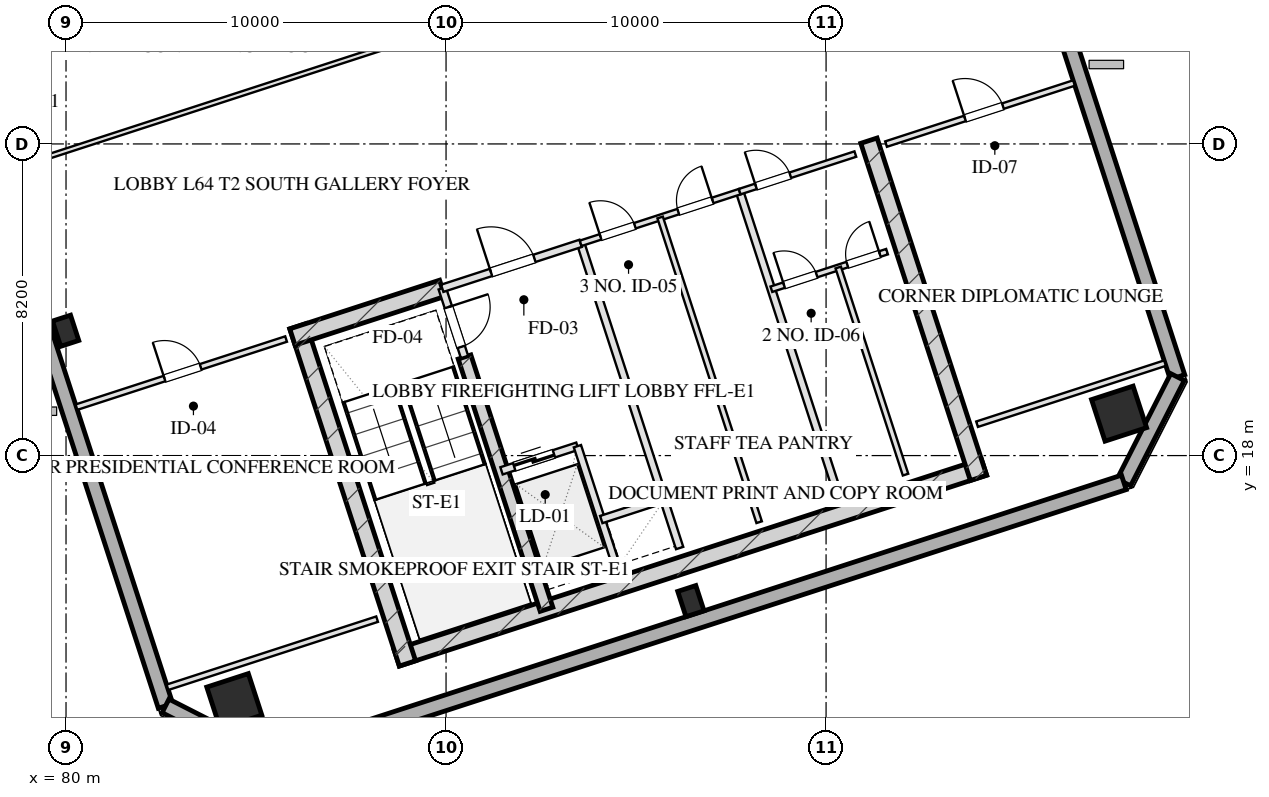
"""IFC4 building model, lengths in metres.
Left out: names, types, materials, properties, quantities, classifications, styles, units other than length and angle.
Written with IfcOpenShell. Run it as: python <this file> out.ifc"""

import sys

from ifc_helpers import new_model, si_unit, direction, frame, frame_2d, origin, origin_2d, place, context, subcontext, project, spatial, rectangle, hollow_rectangle, extrude, element, fill, save


model = new_model("IFC4")
c1 = context("Model", 3, precision=1e-05, world=origin(), true_north=direction((0.0, 1.0)))
c2 = subcontext(c1, "Body", "Model", "MODEL_VIEW")
j1 = project(units=[si_unit("LENGTHUNIT", "METRE"), si_unit("PLANEANGLEUNIT", "RADIAN")], contexts=[c1])
p1 = place(None, origin())
s1 = spatial("IfcSite", under=j1, at=p1, CompositionType="ELEMENT")
p2 = place(p1, origin())
s2 = spatial("IfcBuilding", under=s1, at=p2, CompositionType="ELEMENT")
p3 = place(p2, frame((0.0, 0.0, 237.6)))
s3 = spatial("IfcBuildingStorey", under=s2, at=p3, CompositionType="ELEMENT", Elevation=237.6)
p4 = place(p3, frame((88.701, 12.675, 0.0), z_axis=(0.0, 0.0, 1.0), x_axis=(0.95105824505, 0.309011673763, 0.0)))
e1 = element("IfcWall", 1, at=p4, inside=s3, PredefinedType="SHEAR", context=c2, shape_type="SweptSolid", body=[
    extrude(rectangle(XDim=16.25, YDim=0.45, at=frame_2d((8.125, 0.0))), origin(), (0.0, 0.0, 1.0), 3.2),
])
for number, where, z_axis, x_axis in (
    (2, (86.102, 21.404, 0.0), (0.0, 0.0, 1.0), (0.309, -0.951, 0.0)),
    (3, (101.128, 26.286, 0.0), (0.0, 0.0, 1.0), (0.309, -0.951, 0.0)),
):
    element("IfcWall", number, at=place(p3, frame(where, z_axis=z_axis, x_axis=x_axis)), inside=s3, PredefinedType="SHEAR", context=c2, shape_type="SweptSolid", body=[
        extrude(rectangle(XDim=9.33, YDim=0.45, at=frame_2d((4.665, 0.0))), origin(), (0.0, 0.0, 1.0), 3.2),
    ])
p5 = place(p3, frame((90.486, 20.594, 0.0), z_axis=(0.0, 0.0, 1.0), x_axis=(0.309020428229, -0.951055400562, 0.0)))
e4 = element("IfcWall", 4, at=p5, inside=s3, PredefinedType="SHEAR", context=c2, shape_type="SweptSolid", body=[
    extrude(rectangle(XDim=6.98, YDim=0.35, at=frame_2d((3.49, 0.0))), origin(), (0.0, 0.0, 1.0), 3.2),
])
p6 = place(p3, frame((85.957, 21.12, 0.0), z_axis=(0.0, 0.0, 1.0), x_axis=(0.951064796122, 0.308991510526, 0.0)))
e5 = element("IfcWall", 5, at=p6, inside=s3, PredefinedType="SHEAR", context=c2, shape_type="SweptSolid", body=[
    extrude(rectangle(XDim=4.145, YDim=0.45, at=frame_2d((2.073, 0.0))), origin(), (0.0, 0.0, 1.0), 3.2),
])
for number, where, z_axis, x_axis in (
    (6, (84.428, 11.539, 0.0), (0.0, 0.0, 1.0), (0.951, 0.309, 0.0)),
    (7, (107.71, 19.104, 0.0), (0.0, 0.0, 1.0), (0.951, 0.309, 0.0)),
):
    element("IfcColumn", number, at=place(p3, frame(where, z_axis=z_axis, x_axis=x_axis)), inside=s3, PredefinedType="COLUMN", context=c2, shape_type="SweptSolid", body=[
        extrude(hollow_rectangle(XDim=1.15, YDim=1.15, WallThickness=0.04, at=origin_2d()), origin(), (0.0, 0.0, 1.0), 3.201),
    ])
for number, where, z_axis, x_axis in (
    (8, (79.99, 21.284, 0.0), (0.0, 0.0, 1.0), (0.951, 0.309, 0.0)),
    (9, (96.443, 14.17, 0.0), (0.0, 0.0, 1.0), (0.951, 0.309, 0.0)),
):
    element("IfcColumn", number, at=place(p3, frame(where, z_axis=z_axis, x_axis=x_axis)), inside=s3, PredefinedType="COLUMN", context=c2, shape_type="SweptSolid", body=[
        extrude(hollow_rectangle(XDim=0.5, YDim=0.7, WallThickness=0.025, at=origin_2d()), origin(), (0.0, 0.0, 1.0), 3.201),
    ])
p7 = place(p3, frame((82.618, 11.414, 0.0), z_axis=(0.0, 0.0, 1.0), x_axis=(-0.309016491071, 0.951056679828, 0.0)))
e10 = element("IfcWall", 10, at=p7, inside=s3, PredefinedType="SOLIDWALL", context=c2, shape_type="SweptSolid", body=[
    extrude(rectangle(XDim=38.4, YDim=0.4, at=frame_2d((19.2, 0.0))), origin(), (0.0, 0.0, 1.0), 2.36),
])
p8 = place(p7, frame((20.825, 0.0, 0.75)))
e11 = element("IfcOpeningElement", 11, at=p8, cuts=e10, PredefinedType="OPENING", context=c2, shape_type="SweptSolid", body=[
    extrude(rectangle(XDim=1.95, YDim=1.21, at=frame_2d((0.975, 0.605))), frame((0.0, 0.21, 0.0), z_axis=(0.0, -1.0, 0.0), x_axis=(1.0, 0.0, 0.0)), (0.0, 0.0, 1.0), 0.42),
])
p9 = place(p7, frame((24.625, 0.0, 0.75)))
e12 = element("IfcOpeningElement", 12, at=p9, cuts=e10, PredefinedType="OPENING", context=c2, shape_type="SweptSolid", body=[
    extrude(rectangle(XDim=1.95, YDim=1.21, at=frame_2d((0.975, 0.605))), frame((0.0, 0.21, 0.0), z_axis=(0.0, -1.0, 0.0), x_axis=(1.0, 0.0, 0.0)), (0.0, 0.0, 1.0), 0.42),
])
p10 = place(p7, frame((15.8, 0.0, 0.0)))
e13 = element("IfcOpeningElement", 13, at=p10, cuts=e10, PredefinedType="OPENING", context=c2, shape_type="SweptSolid", body=[
    extrude(rectangle(XDim=1.1, YDim=2.15, at=frame_2d((0.55, 1.075))), frame((0.0, 0.21, 0.0), z_axis=(0.0, -1.0, 0.0), x_axis=(1.0, 0.0, 0.0)), (0.0, 0.0, 1.0), 0.42),
])
p11 = place(p3, frame((97.382, 56.586, 0.0), z_axis=(0.0, 0.0, 1.0), x_axis=(0.309016491071, -0.951056679828, 0.0)))
e14 = element("IfcWall", 14, at=p11, inside=s3, PredefinedType="SOLIDWALL", context=c2, shape_type="SweptSolid", body=[
    extrude(rectangle(XDim=38.4, YDim=0.4, at=frame_2d((19.2, 0.0))), origin(), (0.0, 0.0, 1.0), 2.36),
])
p12 = place(p11, frame((15.625, 0.0, 0.75)))
e15 = element("IfcOpeningElement", 15, at=p12, cuts=e14, PredefinedType="OPENING", context=c2, shape_type="SweptSolid", body=[
    extrude(rectangle(XDim=1.95, YDim=1.21, at=frame_2d((0.975, 0.605))), frame((0.0, 0.21, 0.0), z_axis=(0.0, -1.0, 0.0), x_axis=(1.0, 0.0, 0.0)), (0.0, 0.0, 1.0), 0.42),
])
p13 = place(p11, frame((11.825, 0.0, 0.75)))
e16 = element("IfcOpeningElement", 16, at=p13, cuts=e14, PredefinedType="OPENING", context=c2, shape_type="SweptSolid", body=[
    extrude(rectangle(XDim=1.95, YDim=1.21, at=frame_2d((0.975, 0.605))), frame((0.0, 0.21, 0.0), z_axis=(0.0, -1.0, 0.0), x_axis=(1.0, 0.0, 0.0)), (0.0, 0.0, 1.0), 0.42),
])
p14 = place(p11, frame((21.5, 0.0, 0.0)))
e17 = element("IfcOpeningElement", 17, at=p14, cuts=e14, PredefinedType="OPENING", context=c2, shape_type="SweptSolid", body=[
    extrude(rectangle(XDim=1.1, YDim=2.15, at=frame_2d((0.55, 1.075))), frame((0.0, 0.21, 0.0), z_axis=(0.0, -1.0, 0.0), x_axis=(1.0, 0.0, 0.0)), (0.0, 0.0, 1.0), 0.42),
])
p15 = place(p3, frame((109.248, 20.066, 0.0), z_axis=(0.0, 0.0, 1.0), x_axis=(-0.453949291228, -0.891027519774, 0.0)))
e18 = element("IfcWall", 18, at=p15, inside=s3, PredefinedType="SOLIDWALL", context=c2, shape_type="SweptSolid", body=[
    extrude(rectangle(XDim=3.111, YDim=0.4, at=frame_2d((1.556, 0.0))), origin(), (0.0, 0.0, 1.0), 2.36),
])
p16 = place(p3, frame((107.835, 17.294, 0.0), z_axis=(0.0, 0.0, 1.0), x_axis=(-0.951058012937, -0.309012388148, 0.0)))
e19 = element("IfcWall", 19, at=p16, inside=s3, PredefinedType="SOLIDWALL", context=c2, shape_type="SweptSolid", body=[
    extrude(rectangle(XDim=23.6, YDim=0.4, at=frame_2d((11.8, 0.0))), origin(), (0.0, 0.0, 1.0), 2.36),
])
p17 = place(p3, frame((85.39, 10.001, 0.0), z_axis=(0.0, 0.0, 1.0), x_axis=(-0.890979603174, 0.454043331334, 0.0)))
e20 = element("IfcWall", 20, at=p17, inside=s3, PredefinedType="SOLIDWALL", context=c2, shape_type="SweptSolid", body=[
    extrude(rectangle(XDim=3.111, YDim=0.4, at=frame_2d((1.556, 0.0))), origin(), (0.0, 0.0, 1.0), 2.36),
])
p18 = place(p3, frame((89.899, 22.401, 0.0), z_axis=(0.0, 0.0, 1.0), x_axis=(0.308932062672, -0.951084108086, 0.0)))
e21 = element("IfcWall", 21, at=p18, inside=s3, PredefinedType="PARTITIONING", context=c2, shape_type="SweptSolid", body=[
    extrude(rectangle(XDim=1.9, YDim=0.2, at=frame_2d((0.95, 0.0))), origin(), (0.0, 0.0, 1.0), 2.925),
])
p19 = place(p18, frame((0.52, 0.0, 0.0)))
e22 = element("IfcOpeningElement", 22, at=p19, cuts=e21, PredefinedType="OPENING", context=c2, shape_type="SweptSolid", body=[
    extrude(rectangle(XDim=1.1, YDim=2.05, at=frame_2d((0.55, 1.025))), frame((0.0, 0.11, 0.0), z_axis=(0.0, -1.0, 0.0), x_axis=(1.0, 0.0, 0.0)), (0.0, 0.0, 1.0), 0.22),
])
p20 = place(p3, frame((93.542, 23.585, 0.0), z_axis=(0.0, 0.0, 1.0), x_axis=(0.309042196757, -0.951048327176, 0.0)))
e23 = element("IfcWall", 23, at=p20, inside=s3, PredefinedType="PARTITIONING", context=c2, shape_type="SweptSolid", body=[
    extrude(rectangle(XDim=8.43, YDim=0.2, at=frame_2d((4.215, 0.0))), origin(), (0.0, 0.0, 1.0), 2.925),
])
p21 = place(p3, frame((89.899, 22.401, 0.0), z_axis=(0.0, 0.0, 1.0), x_axis=(0.951046716504, 0.309047153403, 0.0)))
e24 = element("IfcWall", 24, at=p21, inside=s3, PredefinedType="PARTITIONING", context=c2, shape_type="SweptSolid", body=[
    extrude(rectangle(XDim=3.83, YDim=0.2, at=frame_2d((1.915, 0.0))), origin(), (0.0, 0.0, 1.0), 2.925),
])
p22 = place(p21, frame((1.35, 0.0, 0.0)))
e25 = element("IfcOpeningElement", 25, at=p22, cuts=e24, PredefinedType="OPENING", context=c2, shape_type="SweptSolid", body=[
    extrude(rectangle(XDim=1.2, YDim=2.05, at=frame_2d((0.6, 1.025))), frame((0.0, 0.11, 0.0), z_axis=(0.0, -1.0, 0.0), x_axis=(1.0, 0.0, 0.0)), (0.0, 0.0, 1.0), 0.22),
])
p23 = place(p3, frame((91.46, 17.598, 0.0), z_axis=(0.0, 0.0, 1.0), x_axis=(0.951062257173, 0.308999325213, 0.0)))
e26 = element("IfcWall", 26, at=p23, inside=s3, PredefinedType="PARTITIONING", context=c2, shape_type="SweptSolid", body=[
    extrude(rectangle(XDim=2.1, YDim=0.2, at=frame_2d((1.05, 0.0))), origin(), (0.0, 0.0, 1.0), 2.925),
])
p24 = place(p23, frame((0.35, 0.0, 0.0)))
e27 = element("IfcOpeningElement", 27, at=p24, cuts=e26, PredefinedType="OPENING", context=c2, shape_type="SweptSolid", body=[
    extrude(rectangle(XDim=1.1, YDim=2.05, at=frame_2d((0.55, 1.025))), frame((0.0, 0.11, 0.0), z_axis=(0.0, -1.0, 0.0), x_axis=(1.0, 0.0, 0.0)), (0.0, 0.0, 1.0), 0.22),
])
p25 = place(p3, frame((93.457, 18.247, 0.0), z_axis=(0.0, 0.0, 1.0), x_axis=(0.3089935693, -0.951064127245, 0.0)))
e28 = element("IfcWall", 28, at=p25, inside=s3, PredefinedType="PARTITIONING", context=c2, shape_type="SweptSolid", body=[
    extrude(rectangle(XDim=3.7, YDim=0.2, at=frame_2d((1.85, 0.0))), origin(), (0.0, 0.0, 1.0), 2.925),
])
p26 = place(p3, frame((94.084, 16.317, 0.0), z_axis=(0.0, 0.0, 1.0), x_axis=(0.951041328149, 0.309063734775, 0.0)))
e29 = element("IfcWall", 29, at=p26, inside=s3, PredefinedType="PARTITIONING", context=c2, shape_type="SweptSolid", body=[
    extrude(rectangle(XDim=1.73, YDim=0.2, at=frame_2d((0.865, 0.0))), origin(), (0.0, 0.0, 1.0), 2.925),
])
p27 = place(p3, frame((97.727, 24.944, 0.0), z_axis=(0.0, 0.0, 1.0), x_axis=(0.309016001439, -0.951056838919, 0.0)))
e30 = element("IfcWall", 30, at=p27, inside=s3, PredefinedType="PARTITIONING", context=c2, shape_type="SweptSolid", body=[
    extrude(rectangle(XDim=8.43, YDim=0.2, at=frame_2d((4.215, 0.0))), origin(), (0.0, 0.0, 1.0), 2.925),
])
p28 = place(p3, frame((93.542, 23.585, 0.0), z_axis=(0.0, 0.0, 1.0), x_axis=(0.951063829732, 0.308994485023, 0.0)))
e31 = element("IfcWall", 31, at=p28, inside=s3, PredefinedType="PARTITIONING", context=c2, shape_type="SweptSolid", body=[
    extrude(rectangle(XDim=4.4, YDim=0.15, at=frame_2d((2.2, 0.0))), origin(), (0.0, 0.0, 1.0), 2.925),
])
p29 = place(p28, frame((0.55, 0.0, 0.0)))
e32 = element("IfcOpeningElement", 32, at=p29, cuts=e31, PredefinedType="OPENING", context=c2, shape_type="SweptSolid", body=[
    extrude(rectangle(XDim=0.95, YDim=2.05, at=frame_2d((0.475, 1.025))), frame((0.0, 0.085, 0.0), z_axis=(0.0, -1.0, 0.0), x_axis=(1.0, 0.0, 0.0)), (0.0, 0.0, 1.0), 0.17),
])
p30 = place(p28, frame((2.7, 0.0, 0.0)))
e33 = element("IfcOpeningElement", 33, at=p30, cuts=e31, PredefinedType="OPENING", context=c2, shape_type="SweptSolid", body=[
    extrude(rectangle(XDim=0.95, YDim=2.05, at=frame_2d((0.475, 1.025))), frame((0.0, 0.085, 0.0), z_axis=(0.0, -1.0, 0.0), x_axis=(1.0, 0.0, 0.0)), (0.0, 0.0, 1.0), 0.17),
])
p31 = place(p3, frame((95.634, 24.265, 0.0), z_axis=(0.0, 0.0, 1.0), x_axis=(0.309007490203, -0.951059604335, 0.0)))
e34 = element("IfcWall", 34, at=p31, inside=s3, PredefinedType="PARTITIONING", context=c2, shape_type="SweptSolid", body=[
    extrude(rectangle(XDim=8.43, YDim=0.15, at=frame_2d((4.215, 0.0))), origin(), (0.0, 0.0, 1.0), 2.925),
])
p32 = place(p3, frame((97.727, 24.944, 0.0), z_axis=(0.0, 0.0, 1.0), x_axis=(0.951036872128, 0.309077446369, 0.0)))
e35 = element("IfcWall", 35, at=p32, inside=s3, PredefinedType="PARTITIONING", context=c2, shape_type="SweptSolid", body=[
    extrude(rectangle(XDim=3.2, YDim=0.15, at=frame_2d((1.6, 0.0))), origin(), (0.0, 0.0, 1.0), 2.925),
])
p33 = place(p32, frame((0.45, 0.0, 0.0)))
e36 = element("IfcOpeningElement", 36, at=p33, cuts=e35, PredefinedType="OPENING", context=c2, shape_type="SweptSolid", body=[
    extrude(rectangle(XDim=0.95, YDim=2.05, at=frame_2d((0.475, 1.025))), frame((0.0, 0.085, 0.0), z_axis=(0.0, -1.0, 0.0), x_axis=(1.0, 0.0, 0.0)), (0.0, 0.0, 1.0), 0.17),
])
p34 = place(p3, frame((98.561, 22.376, 0.0), z_axis=(0.0, 0.0, 1.0), x_axis=(0.95104415986, 0.309055020985, 0.0)))
e37 = element("IfcWall", 37, at=p34, inside=s3, PredefinedType="PARTITIONING", context=c2, shape_type="SweptSolid", body=[
    extrude(rectangle(XDim=3.2, YDim=0.15, at=frame_2d((1.6, 0.0))), origin(), (0.0, 0.0, 1.0), 2.925),
])
p35 = place(p34, frame((0.35, 0.0, 0.0)))
e38 = element("IfcOpeningElement", 38, at=p35, cuts=e37, PredefinedType="OPENING", context=c2, shape_type="SweptSolid", body=[
    extrude(rectangle(XDim=0.9, YDim=2.05, at=frame_2d((0.45, 1.025))), frame((0.0, 0.085, 0.0), z_axis=(0.0, -1.0, 0.0), x_axis=(1.0, 0.0, 0.0)), (0.0, 0.0, 1.0), 0.17),
])
p36 = place(p34, frame((2.1, 0.0, 0.0)))
e39 = element("IfcOpeningElement", 39, at=p36, cuts=e37, PredefinedType="OPENING", context=c2, shape_type="SweptSolid", body=[
    extrude(rectangle(XDim=0.9, YDim=2.05, at=frame_2d((0.45, 1.025))), frame((0.0, 0.085, 0.0), z_axis=(0.0, -1.0, 0.0), x_axis=(1.0, 0.0, 0.0)), (0.0, 0.0, 1.0), 0.17),
])
p37 = place(p3, frame((100.32, 22.948, 0.0), z_axis=(0.0, 0.0, 1.0), x_axis=(0.309035009867, -0.951050662518, 0.0)))
e40 = element("IfcWall", 40, at=p37, inside=s3, PredefinedType="PARTITIONING", context=c2, shape_type="SweptSolid", body=[
    extrude(rectangle(XDim=5.73, YDim=0.15, at=frame_2d((2.865, 0.0))), origin(), (0.0, 0.0, 1.0), 2.925),
])
p38 = place(p3, frame((82.669, 11.903, 0.0), z_axis=(0.0, 0.0, 1.0), x_axis=(0.951059431056, 0.309008023519, 0.0)))
e41 = element("IfcWall", 41, at=p38, inside=s3, PredefinedType="PARTITIONING", context=c2, shape_type="SweptSolid", body=[
    extrude(rectangle(XDim=5.8, YDim=0.15, at=frame_2d((2.9, 0.0))), origin(), (0.0, 0.0, 1.0), 2.925),
])
p39 = place(p3, frame((80.275, 19.274, 0.0), z_axis=(0.0, 0.0, 1.0), x_axis=(0.951059431056, 0.309008023519, 0.0)))
e42 = element("IfcWall", 42, at=p39, inside=s3, PredefinedType="PARTITIONING", context=c2, shape_type="SweptSolid", body=[
    extrude(rectangle(XDim=5.8, YDim=0.15, at=frame_2d((2.9, 0.0))), origin(), (0.0, 0.0, 1.0), 2.925),
])
p40 = place(p39, frame((2.436, 0.0, 0.0)))
e43 = element("IfcOpeningElement", 43, at=p40, cuts=e42, PredefinedType="OPENING", context=c2, shape_type="SweptSolid", body=[
    extrude(rectangle(XDim=1.0, YDim=2.05, at=frame_2d((0.5, 1.025))), frame((0.0, 0.085, 0.0), z_axis=(0.0, -1.0, 0.0), x_axis=(1.0, 0.0, 0.0)), (0.0, 0.0, 1.0), 0.17),
])
p41 = place(p3, frame((103.973, 18.825, 0.0), z_axis=(0.0, 0.0, 1.0), x_axis=(0.951055112834, 0.309021313752, 0.0)))
e44 = element("IfcWall", 44, at=p41, inside=s3, PredefinedType="PARTITIONING", context=c2, shape_type="SweptSolid", body=[
    extrude(rectangle(XDim=5.2, YDim=0.15, at=frame_2d((2.6, 0.0))), origin(), (0.0, 0.0, 1.0), 2.925),
])
p42 = place(p3, frame((101.578, 26.196, 0.0), z_axis=(0.0, 0.0, 1.0), x_axis=(0.951064427824, 0.308992644131, 0.0)))
e45 = element("IfcWall", 45, at=p42, inside=s3, PredefinedType="PARTITIONING", context=c2, shape_type="SweptSolid", body=[
    extrude(rectangle(XDim=5.2, YDim=0.15, at=frame_2d((2.6, 0.0))), origin(), (0.0, 0.0, 1.0), 2.925),
])
p43 = place(p42, frame((2.184, 0.0, 0.0)))
e46 = element("IfcOpeningElement", 46, at=p43, cuts=e45, PredefinedType="OPENING", context=c2, shape_type="SweptSolid", body=[
    extrude(rectangle(XDim=1.05, YDim=2.05, at=frame_2d((0.525, 1.025))), frame((0.0, 0.085, 0.0), z_axis=(0.0, -1.0, 0.0), x_axis=(1.0, 0.0, 0.0)), (0.0, 0.0, 1.0), 0.17),
])
p44 = place(p3, frame((78.266, 25.456, 0.0), z_axis=(0.0, 0.0, 1.0), x_axis=(0.951056072529, 0.309018360142, 0.0)))
e47 = element("IfcWall", 47, at=p44, inside=s3, PredefinedType="PARTITIONING", context=c2, shape_type="SweptSolid", body=[
    extrude(rectangle(XDim=10.925, YDim=0.12, at=frame_2d((5.462, 0.0))), origin(), (0.0, 0.0, 1.0), 2.925),
])
p45 = place(p19, origin())
e48 = element("IfcDoor", 48, at=p45, inside=s3, OperationType="SINGLE_SWING_LEFT", PredefinedType="DOOR", context=c2, shape_type="SweptSolid", body=[
    extrude(rectangle(XDim=1.1, YDim=2.05, at=frame_2d((0.55, 1.025))), frame((0.0, 0.025, 0.0), z_axis=(0.0, -1.0, 0.0), x_axis=(1.0, 0.0, 0.0)), (0.0, 0.0, 1.0), 0.05),
])
fill(e22, e48)
p46 = place(p22, origin())
e49 = element("IfcDoor", 49, at=p46, inside=s3, OperationType="SINGLE_SWING_LEFT", PredefinedType="DOOR", context=c2, shape_type="SweptSolid", body=[
    extrude(rectangle(XDim=1.2, YDim=2.05, at=frame_2d((0.6, 1.025))), frame((0.0, 0.025, 0.0), z_axis=(0.0, -1.0, 0.0), x_axis=(1.0, 0.0, 0.0)), (0.0, 0.0, 1.0), 0.05),
])
fill(e25, e49)
p47 = place(p24, origin())
e50 = element("IfcDoor", 50, at=p47, inside=s3, OperationType="DOUBLE_DOOR_SLIDING", PredefinedType="DOOR", context=c2, shape_type="SweptSolid", body=[
    extrude(rectangle(XDim=1.1, YDim=2.05, at=frame_2d((0.55, 1.025))), frame((0.0, 0.025, 0.0), z_axis=(0.0, -1.0, 0.0), x_axis=(1.0, 0.0, 0.0)), (0.0, 0.0, 1.0), 0.05),
])
fill(e27, e50)
p48 = place(p29, origin())
e51 = element("IfcDoor", 51, at=p48, inside=s3, OperationType="SINGLE_SWING_LEFT", PredefinedType="DOOR", context=c2, shape_type="SweptSolid", body=[
    extrude(rectangle(XDim=0.95, YDim=2.05, at=frame_2d((0.475, 1.025))), frame((0.0, 0.025, 0.0), z_axis=(0.0, -1.0, 0.0), x_axis=(1.0, 0.0, 0.0)), (0.0, 0.0, 1.0), 0.05),
])
fill(e32, e51)
p49 = place(p30, origin())
e52 = element("IfcDoor", 52, at=p49, inside=s3, OperationType="SINGLE_SWING_RIGHT", PredefinedType="DOOR", context=c2, shape_type="SweptSolid", body=[
    extrude(rectangle(XDim=0.95, YDim=2.05, at=frame_2d((0.475, 1.025))), frame((0.0, 0.025, 0.0), z_axis=(0.0, -1.0, 0.0), x_axis=(1.0, 0.0, 0.0)), (0.0, 0.0, 1.0), 0.05),
])
fill(e33, e52)
p50 = place(p33, origin())
e53 = element("IfcDoor", 53, at=p50, inside=s3, OperationType="SINGLE_SWING_LEFT", PredefinedType="DOOR", context=c2, shape_type="SweptSolid", body=[
    extrude(rectangle(XDim=0.95, YDim=2.05, at=frame_2d((0.475, 1.025))), frame((0.0, 0.025, 0.0), z_axis=(0.0, -1.0, 0.0), x_axis=(1.0, 0.0, 0.0)), (0.0, 0.0, 1.0), 0.05),
])
fill(e36, e53)
p51 = place(p35, origin())
e54 = element("IfcDoor", 54, at=p51, inside=s3, OperationType="SINGLE_SWING_LEFT", PredefinedType="DOOR", context=c2, shape_type="SweptSolid", body=[
    extrude(rectangle(XDim=0.9, YDim=2.05, at=frame_2d((0.45, 1.025))), frame((0.0, 0.025, 0.0), z_axis=(0.0, -1.0, 0.0), x_axis=(1.0, 0.0, 0.0)), (0.0, 0.0, 1.0), 0.05),
])
fill(e38, e54)
p52 = place(p36, origin())
e55 = element("IfcDoor", 55, at=p52, inside=s3, OperationType="SINGLE_SWING_RIGHT", PredefinedType="DOOR", context=c2, shape_type="SweptSolid", body=[
    extrude(rectangle(XDim=0.9, YDim=2.05, at=frame_2d((0.45, 1.025))), frame((0.0, 0.025, 0.0), z_axis=(0.0, -1.0, 0.0), x_axis=(1.0, 0.0, 0.0)), (0.0, 0.0, 1.0), 0.05),
])
fill(e39, e55)
p53 = place(p40, origin())
e56 = element("IfcDoor", 56, at=p53, inside=s3, OperationType="SINGLE_SWING_LEFT", PredefinedType="DOOR", context=c2, shape_type="SweptSolid", body=[
    extrude(rectangle(XDim=1.0, YDim=2.05, at=frame_2d((0.5, 1.025))), frame((0.0, 0.025, 0.0), z_axis=(0.0, -1.0, 0.0), x_axis=(1.0, 0.0, 0.0)), (0.0, 0.0, 1.0), 0.05),
])
fill(e43, e56)
p54 = place(p43, origin())
e57 = element("IfcDoor", 57, at=p54, inside=s3, OperationType="SINGLE_SWING_LEFT", PredefinedType="DOOR", context=c2, shape_type="SweptSolid", body=[
    extrude(rectangle(XDim=1.05, YDim=2.05, at=frame_2d((0.525, 1.025))), frame((0.0, 0.025, 0.0), z_axis=(0.0, -1.0, 0.0), x_axis=(1.0, 0.0, 0.0)), (0.0, 0.0, 1.0), 0.05),
])
fill(e46, e57)
save(model, sys.argv[1])
